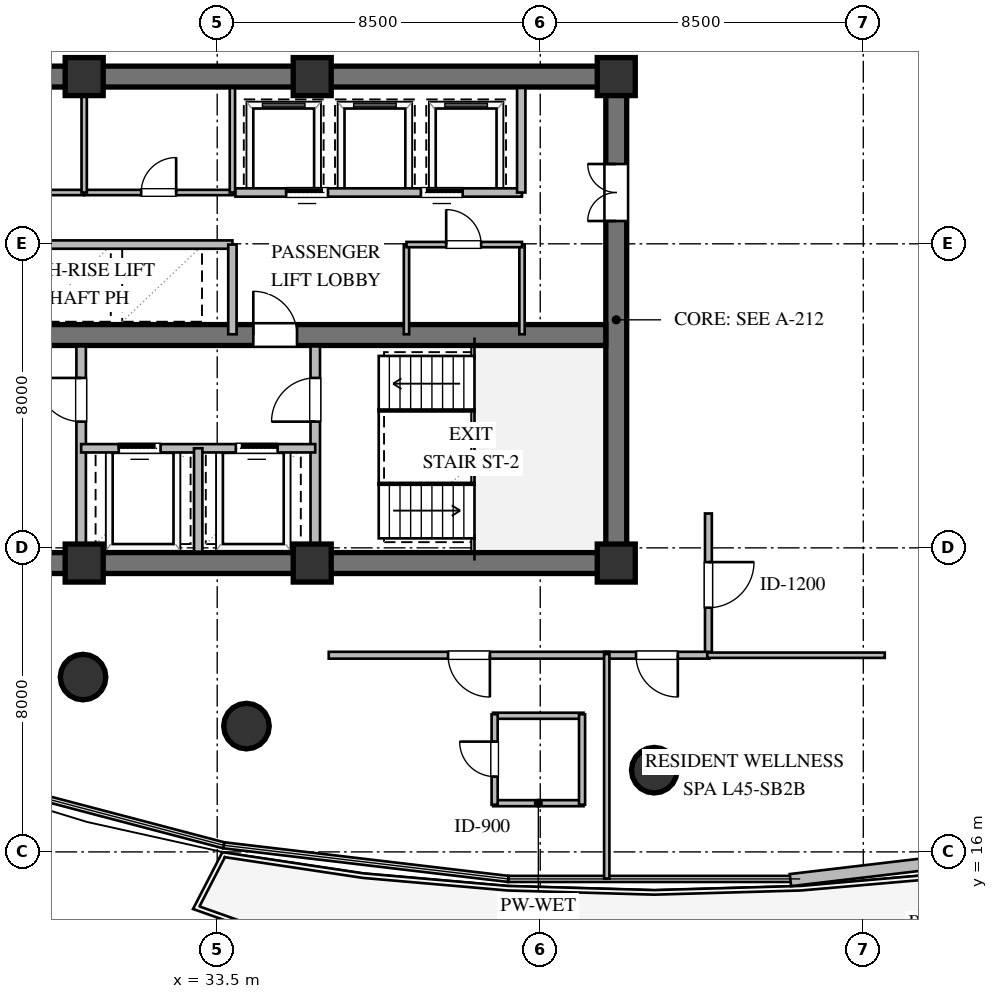
"""IFC4 building model, lengths in metres.
Left out: names, types, materials, properties, quantities, classifications, styles, units other than length and angle.
Written with IfcOpenShell. Run it as: python <this file> out.ifc"""

import sys

from ifc_helpers import new_model, si_unit, direction, frame, frame_2d, origin, origin_2d, place, context, subcontext, project, spatial, rectangle, circle, extrude, element, fill, save


model = new_model("IFC4")
c1 = context("Model", 3, precision=1e-05, world=origin(), true_north=direction((0.0, 1.0)))
c2 = subcontext(c1, "Body", "Model", "MODEL_VIEW")
j1 = project(units=[si_unit("LENGTHUNIT", "METRE"), si_unit("PLANEANGLEUNIT", "RADIAN")], contexts=[c1])
p1 = place(None, origin())
s1 = spatial("IfcSite", under=j1, at=p1, CompositionType="ELEMENT")
p2 = place(p1, origin())
s2 = spatial("IfcBuilding", under=s1, at=p2, CompositionType="ELEMENT")
p3 = place(p2, frame((0.0, 0.0, 171.0)))
s3 = spatial("IfcBuildingStorey", under=s2, at=p3, CompositionType="ELEMENT", Elevation=171.0)
for number, where, z_axis, x_axis in (
    (1, (21.725, 23.6, 0.0), (0.0, 0.0, 1.0), (1.0, 0.0, 0.0)),
    (2, (21.725, 36.4, 0.0), (0.0, 0.0, 1.0), (1.0, 0.0, 0.0)),
):
    element("IfcWall", number, at=place(p3, frame(where, z_axis=z_axis, x_axis=x_axis)), inside=s3, PredefinedType="SHEAR", context=c2, shape_type="SweptSolid", body=[
        extrude(rectangle(XDim=22.55, YDim=0.55, at=frame_2d((11.275, 0.0))), origin(), (0.0, 0.0, 1.0), 3.36),
    ])
p4 = place(p3, frame((44.0, 23.875, 0.0), z_axis=(0.0, 0.0, 1.0), x_axis=(0.0, 1.0, 0.0)))
e3 = element("IfcWall", 3, at=p4, inside=s3, PredefinedType="SHEAR", context=c2, shape_type="SweptSolid", body=[
    extrude(rectangle(XDim=12.25, YDim=0.55, at=frame_2d((6.125, 0.0))), origin(), (0.0, 0.0, 1.0), 3.36),
])
p5 = place(p4, frame((8.725, 0.0, 0.0)))
e4 = element("IfcOpeningElement", 4, at=p5, cuts=e3, PredefinedType="OPENING", context=c2, shape_type="SweptSolid", body=[
    extrude(rectangle(XDim=1.5, YDim=2.15, at=frame_2d((0.75, 1.075))), frame((0.0, 0.285, 0.0), z_axis=(0.0, -1.0, 0.0), x_axis=(1.0, 0.0, 0.0)), (0.0, 0.0, 1.0), 0.57),
])
p6 = place(p3, frame((22.275, 29.6, 0.0), z_axis=(0.0, 0.0, 1.0), x_axis=(1.0, 0.0, 0.0)))
e5 = element("IfcWall", 5, at=p6, inside=s3, PredefinedType="SHEAR", context=c2, shape_type="SweptSolid", body=[
    extrude(rectangle(XDim=21.45, YDim=0.55, at=frame_2d((10.725, 0.0))), origin(), (0.0, 0.0, 1.0), 3.36),
])
p7 = place(p6, frame((12.175, 0.0, 0.0)))
e6 = element("IfcOpeningElement", 6, at=p7, cuts=e5, PredefinedType="OPENING", context=c2, shape_type="SweptSolid", body=[
    extrude(rectangle(XDim=1.15, YDim=2.1, at=frame_2d((0.575, 1.05))), frame((0.0, 0.285, 0.0), z_axis=(0.0, -1.0, 0.0), x_axis=(1.0, 0.0, 0.0)), (0.0, 0.0, 1.0), 0.57),
])
for number, where, z_axis, x_axis in (
    (7, (30.0, 23.6, 0.0), (0.0, 0.0, 1.0), (1.0, 0.0, 0.0)),
    (8, (36.0, 23.6, 0.0), (0.0, 0.0, 1.0), (1.0, 0.0, 0.0)),
    (9, (44.0, 23.6, 0.0), (0.0, 0.0, 1.0), (1.0, 0.0, 0.0)),
    (10, (44.0, 36.4, 0.0), (0.0, 0.0, 1.0), (1.0, 0.0, 0.0)),
    (11, (36.0, 36.4, 0.0), (0.0, 0.0, 1.0), (1.0, 0.0, 0.0)),
    (12, (30.0, 36.4, 0.0), (0.0, 0.0, 1.0), (1.0, 0.0, 0.0)),
):
    element("IfcColumn", number, at=place(p3, frame(where, z_axis=z_axis, x_axis=x_axis)), inside=s3, PredefinedType="COLUMN", context=c2, shape_type="SweptSolid", body=[
        extrude(rectangle(XDim=1.0, YDim=1.0, at=origin_2d()), origin(), (0.0, 0.0, 1.0), 3.6),
    ])
for number, where, z_axis, x_axis in (
    (13, (29.97, 20.6, 0.0), (0.0, 0.0, 1.0), (1.0, 0.0, 0.0)),
    (14, (34.27, 19.31, 0.0), (0.0, 0.0, 1.0), (1.0, 0.0, 0.0)),
    (15, (45.0, 18.15, 0.0), (0.0, 0.0, 1.0), (1.0, 0.0, 0.0)),
):
    element("IfcColumn", number, at=place(p3, frame(where, z_axis=z_axis, x_axis=x_axis)), inside=s3, PredefinedType="COLUMN", context=c2, shape_type="SweptSolid", body=[
        extrude(circle(Radius=0.6, at=origin_2d()), origin(), (0.0, 0.0, 1.0), 3.6),
    ])
p8 = place(p3, frame((56.587, 16.205, 0.0), z_axis=(0.0, 0.0, 1.0), x_axis=(-0.993072847957, -0.117500292131, 0.0)))
e16 = element("IfcWall", 16, at=p8, inside=s3, PredefinedType="STANDARD", context=c2, shape_type="SweptSolid", body=[
    extrude(rectangle(XDim=8.06, YDim=0.32, at=frame_2d((4.03, 0.0))), origin(), (0.0, 0.0, 1.0), 3.36),
])
p9 = place(p8, frame((3.43, 0.0, 0.0)))
e17 = element("IfcOpeningElement", 17, at=p9, cuts=e16, PredefinedType="OPENING", context=c2, shape_type="SweptSolid", body=[
    extrude(rectangle(XDim=1.2, YDim=2.15, at=frame_2d((0.6, 1.075))), frame((0.0, 0.17, 0.0), z_axis=(0.0, -1.0, 0.0), x_axis=(1.0, 0.0, 0.0)), (0.0, 0.0, 1.0), 0.34),
])
p10 = place(p3, frame((29.92, 23.9, 0.0), z_axis=(0.0, 0.0, 1.0), x_axis=(0.0, 1.0, 0.0)))
e18 = element("IfcWall", 18, at=p10, inside=s3, PredefinedType="SOLIDWALL", context=c2, shape_type="SweptSolid", body=[
    extrude(rectangle(XDim=5.4, YDim=0.25, at=frame_2d((2.7, 0.0))), origin(), (0.0, 0.0, 1.0), 2.89),
])
p11 = place(p10, frame((3.421, 0.0, 0.0)))
e19 = element("IfcOpeningElement", 19, at=p11, cuts=e18, PredefinedType="OPENING", context=c2, shape_type="SweptSolid", body=[
    extrude(rectangle(XDim=1.15, YDim=2.1, at=frame_2d((0.575, 1.05))), frame((0.0, 0.135, 0.0), z_axis=(0.0, -1.0, 0.0), x_axis=(1.0, 0.0, 0.0)), (0.0, 0.0, 1.0), 0.27),
])
p12 = place(p3, frame((36.08, 23.9, 0.0), z_axis=(0.0, 0.0, 1.0), x_axis=(0.0, 1.0, 0.0)))
e20 = element("IfcWall", 20, at=p12, inside=s3, PredefinedType="SOLIDWALL", context=c2, shape_type="SweptSolid", body=[
    extrude(rectangle(XDim=5.4, YDim=0.25, at=frame_2d((2.7, 0.0))), origin(), (0.0, 0.0, 1.0), 3.36),
])
p13 = place(p12, frame((3.421, 0.0, 0.0)))
e21 = element("IfcOpeningElement", 21, at=p13, cuts=e20, PredefinedType="OPENING", context=c2, shape_type="SweptSolid", body=[
    extrude(rectangle(XDim=1.15, YDim=2.1, at=frame_2d((0.575, 1.05))), frame((0.0, 0.135, 0.0), z_axis=(0.0, -1.0, 0.0), x_axis=(1.0, 0.0, 0.0)), (0.0, 0.0, 1.0), 0.27),
])
p14 = place(p3, frame((29.92, 26.62, 0.0), z_axis=(0.0, 0.0, 1.0), x_axis=(1.0, 0.0, 0.0)))
e22 = element("IfcWall", 22, at=p14, inside=s3, PredefinedType="SOLIDWALL", context=c2, shape_type="SweptSolid", body=[
    extrude(rectangle(XDim=6.16, YDim=0.22, at=frame_2d((3.08, 0.0))), origin(), (0.0, 0.0, 1.0), 3.36),
])
p15 = place(p14, frame((0.99, 0.0, 0.0)))
e23 = element("IfcOpeningElement", 23, at=p15, cuts=e22, PredefinedType="OPENING", context=c2, shape_type="SweptSolid", body=[
    extrude(rectangle(XDim=1.1, YDim=2.1, at=frame_2d((0.55, 1.05))), frame((0.0, 0.12, 0.0), z_axis=(0.0, -1.0, 0.0), x_axis=(1.0, 0.0, 0.0)), (0.0, 0.0, 1.0), 0.24),
])
p16 = place(p14, frame((4.07, 0.0, 0.0)))
e24 = element("IfcOpeningElement", 24, at=p16, cuts=e22, PredefinedType="OPENING", context=c2, shape_type="SweptSolid", body=[
    extrude(rectangle(XDim=1.1, YDim=2.1, at=frame_2d((0.55, 1.05))), frame((0.0, 0.12, 0.0), z_axis=(0.0, -1.0, 0.0), x_axis=(1.0, 0.0, 0.0)), (0.0, 0.0, 1.0), 0.24),
])
p17 = place(p3, frame((33.0, 23.9, 0.0), z_axis=(0.0, 0.0, 1.0), x_axis=(0.0, 1.0, 0.0)))
e25 = element("IfcWall", 25, at=p17, inside=s3, PredefinedType="SOLIDWALL", context=c2, shape_type="SweptSolid", body=[
    extrude(rectangle(XDim=2.72, YDim=0.22, at=frame_2d((1.36, 0.0))), origin(), (0.0, 0.0, 1.0), 3.36),
])
p18 = place(p3, frame((26.1, 31.98, 0.0), z_axis=(0.0, 0.0, 1.0), x_axis=(1.0, 0.0, 0.0)))
e26 = element("IfcWall", 26, at=p18, inside=s3, PredefinedType="SOLIDWALL", context=c2, shape_type="SweptSolid", body=[
    extrude(rectangle(XDim=7.8, YDim=0.22, at=frame_2d((3.9, 0.0))), origin(), (0.0, 0.0, 1.0), 3.36),
])
p19 = place(p3, frame((33.9, 29.62, 0.0), z_axis=(0.0, 0.0, 1.0), x_axis=(0.0, 1.0, 0.0)))
e27 = element("IfcWall", 27, at=p19, inside=s3, PredefinedType="SOLIDWALL", context=c2, shape_type="SweptSolid", body=[
    extrude(rectangle(XDim=2.36, YDim=0.22, at=frame_2d((1.18, 0.0))), origin(), (0.0, 0.0, 1.0), 3.36),
])
p20 = place(p3, frame((26.05, 33.35, 0.0), z_axis=(0.0, 0.0, 1.0), x_axis=(1.0, 0.0, 0.0)))
e28 = element("IfcWall", 28, at=p20, inside=s3, PredefinedType="PARTITIONING", context=c2, shape_type="SweptSolid", body=[
    extrude(rectangle(XDim=3.95, YDim=0.14, at=frame_2d((1.975, 0.0))), origin(), (0.0, 0.0, 1.0), 3.36),
])
p21 = place(p20, frame((1.515, 0.0, 0.0)))
e29 = element("IfcOpeningElement", 29, at=p21, cuts=e28, PredefinedType="OPENING", context=c2, shape_type="SweptSolid", body=[
    extrude(rectangle(XDim=0.92, YDim=2.1, at=frame_2d((0.46, 1.05))), frame((0.0, 0.08, 0.0), z_axis=(0.0, -1.0, 0.0), x_axis=(1.0, 0.0, 0.0)), (0.0, 0.0, 1.0), 0.16),
])
p22 = place(p3, frame((30.0, 33.35, 0.0), z_axis=(0.0, 0.0, 1.0), x_axis=(1.0, 0.0, 0.0)))
e30 = element("IfcWall", 30, at=p22, inside=s3, PredefinedType="PARTITIONING", context=c2, shape_type="SweptSolid", body=[
    extrude(rectangle(XDim=3.92, YDim=0.14, at=frame_2d((1.96, 0.0))), origin(), (0.0, 0.0, 1.0), 3.36),
])
p23 = place(p22, frame((1.5, 0.0, 0.0)))
e31 = element("IfcOpeningElement", 31, at=p23, cuts=e30, PredefinedType="OPENING", context=c2, shape_type="SweptSolid", body=[
    extrude(rectangle(XDim=0.92, YDim=2.1, at=frame_2d((0.46, 1.05))), frame((0.0, 0.08, 0.0), z_axis=(0.0, -1.0, 0.0), x_axis=(1.0, 0.0, 0.0)), (0.0, 0.0, 1.0), 0.16),
])
for number, where, z_axis, x_axis in (
    (32, (30.0, 33.35, 0.0), (0.0, 0.0, 1.0), (0.0, 1.0, 0.0)),
    (33, (33.9, 33.35, 0.0), (0.0, 0.0, 1.0), (0.0, 1.0, 0.0)),
):
    element("IfcWall", number, at=place(p3, frame(where, z_axis=z_axis, x_axis=x_axis)), inside=s3, PredefinedType="PARTITIONING", context=c2, shape_type="SweptSolid", body=[
        extrude(rectangle(XDim=2.75, YDim=0.14, at=frame_2d((1.375, 0.0))), origin(), (0.0, 0.0, 1.0), 3.36),
    ])
p24 = place(p3, frame((33.98, 33.35, 0.0), z_axis=(0.0, 0.0, 1.0), x_axis=(1.0, 0.0, 0.0)))
e34 = element("IfcWall", 34, at=p24, inside=s3, PredefinedType="SOLIDWALL", context=c2, shape_type="SweptSolid", body=[
    extrude(rectangle(XDim=7.54, YDim=0.22, at=frame_2d((3.77, 0.0))), origin(), (0.0, 0.0, 1.0), 3.36),
])
p25 = place(p24, frame((1.335, 0.0, 0.0)))
e35 = element("IfcOpeningElement", 35, at=p25, cuts=e34, PredefinedType="OPENING", context=c2, shape_type="SweptSolid", body=[
    extrude(rectangle(XDim=1.1, YDim=2.1, at=frame_2d((0.55, 1.05))), frame((0.0, 0.12, 0.0), z_axis=(0.0, -1.0, 0.0), x_axis=(1.0, 0.0, 0.0)), (0.0, 0.0, 1.0), 0.24),
])
p26 = place(p24, frame((4.879, 0.0, 0.0)))
e36 = element("IfcOpeningElement", 36, at=p26, cuts=e34, PredefinedType="OPENING", context=c2, shape_type="SweptSolid", body=[
    extrude(rectangle(XDim=1.1, YDim=2.1, at=frame_2d((0.55, 1.05))), frame((0.0, 0.12, 0.0), z_axis=(0.0, -1.0, 0.0), x_axis=(1.0, 0.0, 0.0)), (0.0, 0.0, 1.0), 0.24),
])
p27 = place(p3, frame((41.5, 33.35, 0.0), z_axis=(0.0, 0.0, 1.0), x_axis=(0.0, 1.0, 0.0)))
e37 = element("IfcWall", 37, at=p27, inside=s3, PredefinedType="SOLIDWALL", context=c2, shape_type="SweptSolid", body=[
    extrude(rectangle(XDim=2.75, YDim=0.22, at=frame_2d((1.375, 0.0))), origin(), (0.0, 0.0, 1.0), 3.36),
])
for number, where, z_axis, x_axis in (
    (38, (38.48, 29.62, 0.0), (0.0, 0.0, 1.0), (0.0, 1.0, 0.0)),
    (39, (41.52, 29.62, 0.0), (0.0, 0.0, 1.0), (0.0, 1.0, 0.0)),
):
    element("IfcWall", number, at=place(p3, frame(where, z_axis=z_axis, x_axis=x_axis)), inside=s3, PredefinedType="PARTITIONING", context=c2, shape_type="SweptSolid", body=[
        extrude(rectangle(XDim=2.36, YDim=0.14, at=frame_2d((1.18, 0.0))), origin(), (0.0, 0.0, 1.0), 3.36),
    ])
p28 = place(p3, frame((38.48, 31.98, 0.0), z_axis=(0.0, 0.0, 1.0), x_axis=(1.0, 0.0, 0.0)))
e40 = element("IfcWall", 40, at=p28, inside=s3, PredefinedType="PARTITIONING", context=c2, shape_type="SweptSolid", body=[
    extrude(rectangle(XDim=3.04, YDim=0.14, at=frame_2d((1.52, 0.0))), origin(), (0.0, 0.0, 1.0), 3.36),
])
p29 = place(p28, frame((1.045, 0.0, 0.0)))
e41 = element("IfcOpeningElement", 41, at=p29, cuts=e40, PredefinedType="OPENING", context=c2, shape_type="SweptSolid", body=[
    extrude(rectangle(XDim=0.92, YDim=2.1, at=frame_2d((0.46, 1.05))), frame((0.0, 0.08, 0.0), z_axis=(0.0, -1.0, 0.0), x_axis=(1.0, 0.0, 0.0)), (0.0, 0.0, 1.0), 0.16),
])
for number, where, z_axis, x_axis in (
    (42, (40.76, 17.282, 0.0), (0.0, 0.0, 1.0), (1.0, 0.0, 0.0)),
    (43, (40.76, 19.582, 0.0), (0.0, 0.0, 1.0), (1.0, 0.0, 0.0)),
):
    element("IfcWall", number, at=place(p3, frame(where, z_axis=z_axis, x_axis=x_axis)), inside=s3, PredefinedType="PLUMBINGWALL", context=c2, shape_type="SweptSolid", body=[
        extrude(rectangle(XDim=2.38, YDim=0.16, at=frame_2d((1.19, 0.0))), origin(), (0.0, 0.0, 1.0), 3.36),
    ])
p30 = place(p3, frame((40.8, 17.242, 0.0), z_axis=(0.0, 0.0, 1.0), x_axis=(0.0, 1.0, 0.0)))
e44 = element("IfcWall", 44, at=p30, inside=s3, PredefinedType="PLUMBINGWALL", context=c2, shape_type="SweptSolid", body=[
    extrude(rectangle(XDim=2.38, YDim=0.16, at=frame_2d((1.19, 0.0))), origin(), (0.0, 0.0, 1.0), 3.36),
])
p31 = place(p30, frame((0.74, 0.0, 0.0)))
e45 = element("IfcOpeningElement", 45, at=p31, cuts=e44, PredefinedType="OPENING", context=c2, shape_type="SweptSolid", body=[
    extrude(rectangle(XDim=0.92, YDim=2.1, at=frame_2d((0.46, 1.05))), frame((0.0, 0.09, 0.0), z_axis=(0.0, -1.0, 0.0), x_axis=(1.0, 0.0, 0.0)), (0.0, 0.0, 1.0), 0.18),
])
p32 = place(p3, frame((43.1, 17.242, 0.0), z_axis=(0.0, 0.0, 1.0), x_axis=(0.0, 1.0, 0.0)))
e46 = element("IfcWall", 46, at=p32, inside=s3, PredefinedType="PLUMBINGWALL", context=c2, shape_type="SweptSolid", body=[
    extrude(rectangle(XDim=2.38, YDim=0.16, at=frame_2d((1.19, 0.0))), origin(), (0.0, 0.0, 1.0), 3.36),
])
p33 = place(p3, frame((46.425, 24.905, 0.0), z_axis=(0.0, 0.0, 1.0), x_axis=(0.0, -1.0, 0.0)))
e47 = element("IfcWall", 47, at=p33, inside=s3, PredefinedType="PARTITIONING", context=c2, shape_type="SweptSolid", body=[
    extrude(rectangle(XDim=3.76, YDim=0.18, at=frame_2d((1.88, 0.0))), origin(), (0.0, 0.0, 1.0), 3.36),
])
p34 = place(p33, frame((1.28, 0.0, 0.0)))
e48 = element("IfcOpeningElement", 48, at=p34, cuts=e47, PredefinedType="OPENING", context=c2, shape_type="SweptSolid", body=[
    extrude(rectangle(XDim=1.2, YDim=2.15, at=frame_2d((0.6, 1.075))), frame((0.0, 0.1, 0.0), z_axis=(0.0, -1.0, 0.0), x_axis=(1.0, 0.0, 0.0)), (0.0, 0.0, 1.0), 0.2),
])
p35 = place(p3, frame((43.815, 21.175, 0.0), z_axis=(0.0, 0.0, 1.0), x_axis=(-1.0, 0.0, 0.0)))
e49 = element("IfcWall", 49, at=p35, inside=s3, PredefinedType="PARTITIONING", context=c2, shape_type="SweptSolid", body=[
    extrude(rectangle(XDim=7.38, YDim=0.18, at=frame_2d((3.69, 0.0))), origin(), (0.0, 0.0, 1.0), 2.996),
])
p36 = place(p35, frame((3.14, 0.0, 0.0)))
e50 = element("IfcOpeningElement", 50, at=p36, cuts=e49, PredefinedType="OPENING", context=c2, shape_type="SweptSolid", body=[
    extrude(rectangle(XDim=1.1, YDim=2.1, at=frame_2d((0.55, 1.05))), frame((0.0, 0.1, 0.0), z_axis=(0.0, -1.0, 0.0), x_axis=(1.0, 0.0, 0.0)), (0.0, 0.0, 1.0), 0.2),
])
p37 = place(p3, frame((46.455, 21.175, 0.0), z_axis=(0.0, 0.0, 1.0), x_axis=(-1.0, 0.0, 0.0)))
e51 = element("IfcWall", 51, at=p37, inside=s3, PredefinedType="PARTITIONING", context=c2, shape_type="SweptSolid", body=[
    extrude(rectangle(XDim=2.77, YDim=0.18, at=frame_2d((1.385, 0.0))), origin(), (0.0, 0.0, 1.0), 2.996),
])
p38 = place(p37, frame((0.835, 0.0, 0.0)))
e52 = element("IfcOpeningElement", 52, at=p38, cuts=e51, PredefinedType="OPENING", context=c2, shape_type="SweptSolid", body=[
    extrude(rectangle(XDim=1.1, YDim=2.1, at=frame_2d((0.55, 1.05))), frame((0.0, 0.1, 0.0), z_axis=(0.0, -1.0, 0.0), x_axis=(1.0, 0.0, 0.0)), (0.0, 0.0, 1.0), 0.2),
])
p39 = place(p3, frame((51.065, 21.175, 0.0), z_axis=(0.0, 0.0, 1.0), x_axis=(-1.0, 0.0, 0.0)))
e53 = element("IfcWall", 53, at=p39, inside=s3, PredefinedType="PARTITIONING", context=c2, shape_type="SweptSolid", body=[
    extrude(rectangle(XDim=4.67, YDim=0.14, at=frame_2d((2.335, 0.0))), origin(), (0.0, 0.0, 1.0), 2.996),
])
p40 = place(p3, frame((43.75, 21.205, 0.0), z_axis=(0.0, 0.0, 1.0), x_axis=(0.0, -1.0, 0.0)))
e54 = element("IfcWall", 54, at=p40, inside=s3, PredefinedType="PARTITIONING", context=c2, shape_type="SweptSolid", body=[
    extrude(rectangle(XDim=5.906, YDim=0.14, at=frame_2d((2.953, 0.0))), origin(), (0.0, 0.0, 1.0), 3.36),
])
p41 = place(p11, origin())
e55 = element("IfcDoor", 55, at=p41, inside=s3, OperationType="SINGLE_SWING_RIGHT", PredefinedType="DOOR", context=c2, shape_type="SweptSolid", body=[
    extrude(rectangle(XDim=1.15, YDim=2.1, at=frame_2d((0.575, 1.05))), frame((0.0, 0.025, 0.0), z_axis=(0.0, -1.0, 0.0), x_axis=(1.0, 0.0, 0.0)), (0.0, 0.0, 1.0), 0.05),
])
fill(e19, e55)
p42 = place(p13, origin())
e56 = element("IfcDoor", 56, at=p42, inside=s3, OperationType="SINGLE_SWING_LEFT", PredefinedType="DOOR", context=c2, shape_type="SweptSolid", body=[
    extrude(rectangle(XDim=1.15, YDim=2.1, at=frame_2d((0.575, 1.05))), frame((0.0, 0.025, 0.0), z_axis=(0.0, -1.0, 0.0), x_axis=(1.0, 0.0, 0.0)), (0.0, 0.0, 1.0), 0.05),
])
fill(e21, e56)
p43 = place(p15, origin())
e57 = element("IfcDoor", 57, at=p43, inside=s3, OperationType="SLIDING_TO_LEFT", PredefinedType="DOOR", context=c2, shape_type="SweptSolid", body=[
    extrude(rectangle(XDim=1.1, YDim=2.1, at=frame_2d((0.55, 1.05))), frame((0.0, 0.025, 0.0), z_axis=(0.0, -1.0, 0.0), x_axis=(1.0, 0.0, 0.0)), (0.0, 0.0, 1.0), 0.05),
])
fill(e23, e57)
p44 = place(p16, origin())
e58 = element("IfcDoor", 58, at=p44, inside=s3, OperationType="SLIDING_TO_RIGHT", PredefinedType="DOOR", context=c2, shape_type="SweptSolid", body=[
    extrude(rectangle(XDim=1.1, YDim=2.1, at=frame_2d((0.55, 1.05))), frame((0.0, 0.025, 0.0), z_axis=(0.0, -1.0, 0.0), x_axis=(1.0, 0.0, 0.0)), (0.0, 0.0, 1.0), 0.05),
])
fill(e24, e58)
p45 = place(p7, origin())
e59 = element("IfcDoor", 59, at=p45, inside=s3, OperationType="SINGLE_SWING_LEFT", PredefinedType="DOOR", context=c2, shape_type="SweptSolid", body=[
    extrude(rectangle(XDim=1.15, YDim=2.1, at=frame_2d((0.575, 1.05))), frame((0.0, 0.025, 0.0), z_axis=(0.0, -1.0, 0.0), x_axis=(1.0, 0.0, 0.0)), (0.0, 0.0, 1.0), 0.05),
])
fill(e6, e59)
p46 = place(p5, origin())
e60 = element("IfcDoor", 60, at=p46, inside=s3, OperationType="DOUBLE_DOOR_SINGLE_SWING", PredefinedType="DOOR", context=c2, shape_type="SweptSolid", body=[
    extrude(rectangle(XDim=1.5, YDim=2.15, at=frame_2d((0.75, 1.075))), frame((0.0, 0.025, 0.0), z_axis=(0.0, -1.0, 0.0), x_axis=(1.0, 0.0, 0.0)), (0.0, 0.0, 1.0), 0.05),
])
fill(e4, e60)
p47 = place(p23, origin())
e61 = element("IfcDoor", 61, at=p47, inside=s3, OperationType="SINGLE_SWING_RIGHT", PredefinedType="DOOR", context=c2, shape_type="SweptSolid", body=[
    extrude(rectangle(XDim=0.92, YDim=2.1, at=frame_2d((0.46, 1.05))), frame((0.0, 0.025, 0.0), z_axis=(0.0, -1.0, 0.0), x_axis=(1.0, 0.0, 0.0)), (0.0, 0.0, 1.0), 0.05),
])
fill(e31, e61)
p48 = place(p25, origin())
e62 = element("IfcDoor", 62, at=p48, inside=s3, OperationType="SLIDING_TO_LEFT", PredefinedType="DOOR", context=c2, shape_type="SweptSolid", body=[
    extrude(rectangle(XDim=1.1, YDim=2.1, at=frame_2d((0.55, 1.05))), frame((0.0, 0.025, 0.0), z_axis=(0.0, -1.0, 0.0), x_axis=(1.0, 0.0, 0.0)), (0.0, 0.0, 1.0), 0.05),
])
fill(e35, e62)
p49 = place(p26, origin())
e63 = element("IfcDoor", 63, at=p49, inside=s3, OperationType="SLIDING_TO_RIGHT", PredefinedType="DOOR", context=c2, shape_type="SweptSolid", body=[
    extrude(rectangle(XDim=1.1, YDim=2.1, at=frame_2d((0.55, 1.05))), frame((0.0, 0.025, 0.0), z_axis=(0.0, -1.0, 0.0), x_axis=(1.0, 0.0, 0.0)), (0.0, 0.0, 1.0), 0.05),
])
fill(e36, e63)
p50 = place(p29, origin())
e64 = element("IfcDoor", 64, at=p50, inside=s3, OperationType="SINGLE_SWING_LEFT", PredefinedType="DOOR", context=c2, shape_type="SweptSolid", body=[
    extrude(rectangle(XDim=0.92, YDim=2.1, at=frame_2d((0.46, 1.05))), frame((0.0, 0.025, 0.0), z_axis=(0.0, -1.0, 0.0), x_axis=(1.0, 0.0, 0.0)), (0.0, 0.0, 1.0), 0.05),
])
fill(e41, e64)
p51 = place(p31, origin())
e65 = element("IfcDoor", 65, at=p51, inside=s3, OperationType="SINGLE_SWING_RIGHT", PredefinedType="DOOR", context=c2, shape_type="SweptSolid", body=[
    extrude(rectangle(XDim=0.92, YDim=2.1, at=frame_2d((0.46, 1.05))), frame((0.0, 0.025, 0.0), z_axis=(0.0, -1.0, 0.0), x_axis=(1.0, 0.0, 0.0)), (0.0, 0.0, 1.0), 0.05),
])
fill(e45, e65)
p52 = place(p34, origin())
e66 = element("IfcDoor", 66, at=p52, inside=s3, OperationType="SINGLE_SWING_LEFT", PredefinedType="DOOR", context=c2, shape_type="SweptSolid", body=[
    extrude(rectangle(XDim=1.2, YDim=2.15, at=frame_2d((0.6, 1.075))), frame((0.0, 0.025, 0.0), z_axis=(0.0, -1.0, 0.0), x_axis=(1.0, 0.0, 0.0)), (0.0, 0.0, 1.0), 0.05),
])
fill(e48, e66)
p53 = place(p36, origin())
e67 = element("IfcDoor", 67, at=p53, inside=s3, OperationType="SINGLE_SWING_LEFT", PredefinedType="DOOR", context=c2, shape_type="SweptSolid", body=[
    extrude(rectangle(XDim=1.1, YDim=2.1, at=frame_2d((0.55, 1.05))), frame((0.0, 0.025, 0.0), z_axis=(0.0, -1.0, 0.0), x_axis=(1.0, 0.0, 0.0)), (0.0, 0.0, 1.0), 0.05),
])
fill(e50, e67)
p54 = place(p38, origin())
e68 = element("IfcDoor", 68, at=p54, inside=s3, OperationType="SINGLE_SWING_LEFT", PredefinedType="DOOR", context=c2, shape_type="SweptSolid", body=[
    extrude(rectangle(XDim=1.1, YDim=2.1, at=frame_2d((0.55, 1.05))), frame((0.0, 0.025, 0.0), z_axis=(0.0, -1.0, 0.0), x_axis=(1.0, 0.0, 0.0)), (0.0, 0.0, 1.0), 0.05),
])
fill(e52, e68)
save(model, sys.argv[1])
